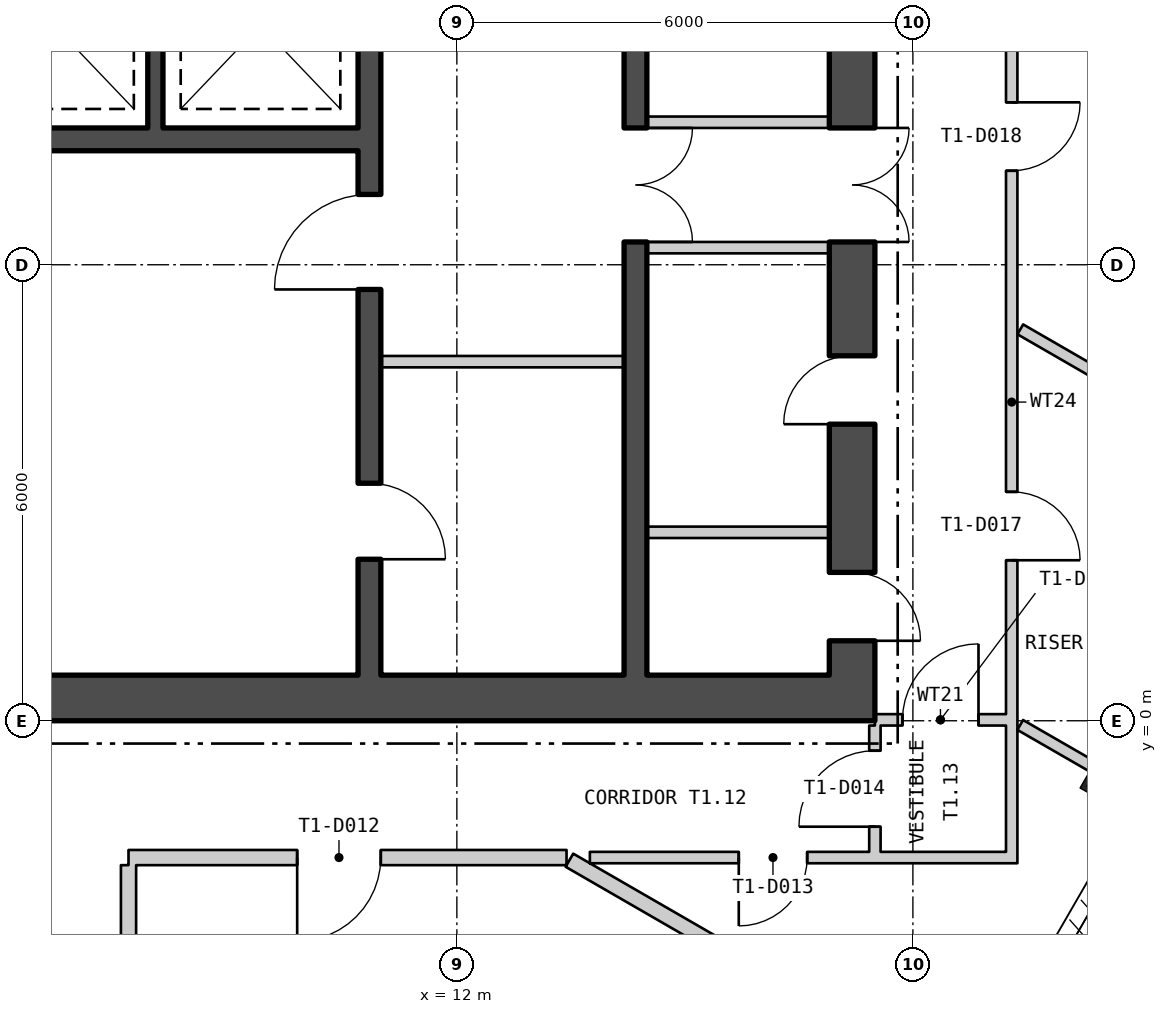
"""IFC4 building model, lengths in metres.
Left out: names, types, materials, properties, quantities, classifications, styles, units other than length and angle.
Written with IfcOpenShell. Run it as: python <this file> out.ifc"""

import sys

from ifc_helpers import new_model, si_unit, direction, frame, frame_2d, origin, origin_2d, place, context, subcontext, project, spatial, polyline, rectangle, hollow_rectangle, outline, extrude, element, fill, save


model = new_model("IFC4")
c1 = context("Model", 3, precision=1e-05, world=origin(), true_north=direction((0.0, 1.0)))
c2 = subcontext(c1, "Body", "Model", "MODEL_VIEW")
j1 = project(units=[si_unit("LENGTHUNIT", "METRE"), si_unit("PLANEANGLEUNIT", "RADIAN")], contexts=[c1])
p1 = place(None, origin())
s1 = spatial("IfcSite", under=j1, at=p1, CompositionType="ELEMENT")
p2 = place(p1, origin())
s2 = spatial("IfcBuilding", under=s1, at=p2, CompositionType="ELEMENT")
p3 = place(p2, frame((0.0, 0.0, 78.3)))
s3 = spatial("IfcBuildingStorey", under=s2, at=p3, CompositionType="ELEMENT", Elevation=78.3)
p4 = place(p3, frame((20.665, -0.778, 0.0), z_axis=(0.0, 0.0, 1.0), x_axis=(0.5, 0.866025403784, 0.0)))
e1 = element("IfcColumn", 1, at=p4, inside=s3, PredefinedType="COLUMN", context=c2, shape_type="SweptSolid", body=[
    extrude(hollow_rectangle(XDim=0.65, YDim=0.7, WallThickness=0.065, at=origin_2d()), origin(), (0.0, 0.0, 1.0), 6.0),
])
p5 = place(p3, frame((5.22, -28.679, -0.18), z_axis=(0.0, 0.0, 1.0), x_axis=(0.500000711659, 0.866024992908, 0.0)))
e2 = element("IfcWall", 2, at=p5, inside=s3, PredefinedType="SOLIDWALL", context=c2, shape_type="SweptSolid", body=[
    extrude(outline(polyline([(-0.13, -0.225), (45.87, -0.225), (45.61, 0.225), (0.13, 0.225), (-0.13, -0.225)])), origin(), (0.0, 0.0, 1.0), 6.0),
])
p6 = place(p5, frame((1.424, 0.0, 1.38)))
e3 = element("IfcOpeningElement", 3, at=p6, cuts=e2, PredefinedType="OPENING", context=c2, shape_type="SweptSolid", body=[
    extrude(rectangle(XDim=2.4, YDim=3.6, at=frame_2d((1.2, 1.8))), frame((0.0, 0.235, 0.0), z_axis=(0.0, -1.0, 0.0), x_axis=(1.0, 0.0, 0.0)), (0.0, 0.0, 1.0), 0.47),
])
p7 = place(p5, frame((5.893, 0.0, 1.38)))
e4 = element("IfcOpeningElement", 4, at=p7, cuts=e2, PredefinedType="OPENING", context=c2, shape_type="SweptSolid", body=[
    extrude(rectangle(XDim=2.4, YDim=3.6, at=frame_2d((1.2, 1.8))), frame((0.0, 0.235, 0.0), z_axis=(0.0, -1.0, 0.0), x_axis=(1.0, 0.0, 0.0)), (0.0, 0.0, 1.0), 0.47),
])
p8 = place(p5, frame((10.401, 0.0, 1.38)))
e5 = element("IfcOpeningElement", 5, at=p8, cuts=e2, PredefinedType="OPENING", context=c2, shape_type="SweptSolid", body=[
    extrude(rectangle(XDim=2.4, YDim=3.6, at=frame_2d((1.2, 1.8))), frame((0.0, 0.235, 0.0), z_axis=(0.0, -1.0, 0.0), x_axis=(1.0, 0.0, 0.0)), (0.0, 0.0, 1.0), 0.47),
])
p9 = place(p5, frame((14.909, 0.0, 1.38)))
e6 = element("IfcOpeningElement", 6, at=p9, cuts=e2, PredefinedType="OPENING", context=c2, shape_type="SweptSolid", body=[
    extrude(rectangle(XDim=2.4, YDim=3.6, at=frame_2d((1.2, 1.8))), frame((0.0, 0.235, 0.0), z_axis=(0.0, -1.0, 0.0), x_axis=(1.0, 0.0, 0.0)), (0.0, 0.0, 1.0), 0.47),
])
p10 = place(p5, frame((19.416, 0.0, 1.38)))
e7 = element("IfcOpeningElement", 7, at=p10, cuts=e2, PredefinedType="OPENING", context=c2, shape_type="SweptSolid", body=[
    extrude(rectangle(XDim=2.4, YDim=3.6, at=frame_2d((1.2, 1.8))), frame((0.0, 0.235, 0.0), z_axis=(0.0, -1.0, 0.0), x_axis=(1.0, 0.0, 0.0)), (0.0, 0.0, 1.0), 0.47),
])
p11 = place(p5, frame((23.924, 0.0, 1.38)))
e8 = element("IfcOpeningElement", 8, at=p11, cuts=e2, PredefinedType="OPENING", context=c2, shape_type="SweptSolid", body=[
    extrude(rectangle(XDim=2.4, YDim=3.6, at=frame_2d((1.2, 1.8))), frame((0.0, 0.235, 0.0), z_axis=(0.0, -1.0, 0.0), x_axis=(1.0, 0.0, 0.0)), (0.0, 0.0, 1.0), 0.47),
])
p12 = place(p5, frame((28.431, 0.0, 1.38)))
e9 = element("IfcOpeningElement", 9, at=p12, cuts=e2, PredefinedType="OPENING", context=c2, shape_type="SweptSolid", body=[
    extrude(rectangle(XDim=2.4, YDim=3.6, at=frame_2d((1.2, 1.8))), frame((0.0, 0.235, 0.0), z_axis=(0.0, -1.0, 0.0), x_axis=(1.0, 0.0, 0.0)), (0.0, 0.0, 1.0), 0.47),
])
p13 = place(p5, frame((32.939, 0.0, 1.38)))
e10 = element("IfcOpeningElement", 10, at=p13, cuts=e2, PredefinedType="OPENING", context=c2, shape_type="SweptSolid", body=[
    extrude(rectangle(XDim=2.4, YDim=3.6, at=frame_2d((1.2, 1.8))), frame((0.0, 0.235, 0.0), z_axis=(0.0, -1.0, 0.0), x_axis=(1.0, 0.0, 0.0)), (0.0, 0.0, 1.0), 0.47),
])
p14 = place(p5, frame((37.447, 0.0, 1.38)))
e11 = element("IfcOpeningElement", 11, at=p14, cuts=e2, PredefinedType="OPENING", context=c2, shape_type="SweptSolid", body=[
    extrude(rectangle(XDim=2.4, YDim=3.6, at=frame_2d((1.2, 1.8))), frame((0.0, 0.235, 0.0), z_axis=(0.0, -1.0, 0.0), x_axis=(1.0, 0.0, 0.0)), (0.0, 0.0, 1.0), 0.47),
])
p15 = place(p5, frame((41.916, 0.0, 1.38)))
e12 = element("IfcOpeningElement", 12, at=p15, cuts=e2, PredefinedType="OPENING", context=c2, shape_type="SweptSolid", body=[
    extrude(rectangle(XDim=2.4, YDim=3.6, at=frame_2d((1.2, 1.8))), frame((0.0, 0.235, 0.0), z_axis=(0.0, -1.0, 0.0), x_axis=(1.0, 0.0, 0.0)), (0.0, 0.0, 1.0), 0.47),
])
p16 = place(p3, frame((-17.5, 0.3, 0.0), z_axis=(0.0, 0.0, 1.0), x_axis=(1.0, 0.0, 0.0)))
e13 = element("IfcWall", 13, at=p16, inside=s3, PredefinedType="SHEAR", context=c2, shape_type="SweptSolid", body=[
    extrude(rectangle(XDim=35.0, YDim=0.6, at=frame_2d((17.5, 0.0))), origin(), (0.0, 0.0, 1.0), 5.8),
])
p17 = place(p16, frame((12.0, 0.0, 0.0)))
e14 = element("IfcOpeningElement", 14, at=p17, cuts=e13, PredefinedType="OPENING", context=c2, shape_type="SweptSolid", body=[
    extrude(rectangle(XDim=1.8, YDim=2.4, at=frame_2d((0.9, 1.2))), frame((0.0, 0.31, 0.0), z_axis=(0.0, -1.0, 0.0), x_axis=(1.0, 0.0, 0.0)), (0.0, 0.0, 1.0), 0.62),
])
p18 = place(p16, frame((22.0, 0.0, 0.0)))
e15 = element("IfcOpeningElement", 15, at=p18, cuts=e13, PredefinedType="OPENING", context=c2, shape_type="SweptSolid", body=[
    extrude(rectangle(XDim=1.8, YDim=2.4, at=frame_2d((0.9, 1.2))), frame((0.0, 0.31, 0.0), z_axis=(0.0, -1.0, 0.0), x_axis=(1.0, 0.0, 0.0)), (0.0, 0.0, 1.0), 0.62),
])
p19 = place(p3, frame((17.2, 0.6, 0.0), z_axis=(0.0, 0.0, 1.0), x_axis=(0.0, 1.0, 0.0)))
e16 = element("IfcWall", 16, at=p19, inside=s3, PredefinedType="SHEAR", context=c2, shape_type="SweptSolid", body=[
    extrude(rectangle(XDim=16.8, YDim=0.6, at=frame_2d((8.4, 0.0))), origin(), (0.0, 0.0, 1.0), 5.8),
])
p20 = place(p19, frame((5.7, 0.0, 0.0)))
e17 = element("IfcOpeningElement", 17, at=p20, cuts=e16, PredefinedType="OPENING", context=c2, shape_type="SweptSolid", body=[
    extrude(rectangle(XDim=1.5, YDim=2.1, at=frame_2d((0.75, 1.05))), frame((0.0, 0.31, 0.0), z_axis=(0.0, -1.0, 0.0), x_axis=(1.0, 0.0, 0.0)), (0.0, 0.0, 1.0), 0.62),
])
p21 = place(p19, frame((0.452, 0.0, 0.0)))
e18 = element("IfcOpeningElement", 18, at=p21, cuts=e16, PredefinedType="OPENING", context=c2, shape_type="SweptSolid", body=[
    extrude(rectangle(XDim=0.9, YDim=2.1, at=frame_2d((0.45, 1.05))), frame((0.0, 0.31, 0.0), z_axis=(0.0, -1.0, 0.0), x_axis=(1.0, 0.0, 0.0)), (0.0, 0.0, 1.0), 0.62),
])
p22 = place(p19, frame((3.302, 0.0, 0.0)))
e19 = element("IfcOpeningElement", 19, at=p22, cuts=e16, PredefinedType="OPENING", context=c2, shape_type="SweptSolid", body=[
    extrude(rectangle(XDim=0.9, YDim=2.1, at=frame_2d((0.45, 1.05))), frame((0.0, 0.31, 0.0), z_axis=(0.0, -1.0, 0.0), x_axis=(1.0, 0.0, 0.0)), (0.0, 0.0, 1.0), 0.62),
])
p23 = place(p19, frame((10.697, 0.0, 0.0)))
e20 = element("IfcOpeningElement", 20, at=p23, cuts=e16, PredefinedType="OPENING", context=c2, shape_type="SweptSolid", body=[
    extrude(rectangle(XDim=0.9, YDim=2.1, at=frame_2d((0.45, 1.05))), frame((0.0, 0.31, 0.0), z_axis=(0.0, -1.0, 0.0), x_axis=(1.0, 0.0, 0.0)), (0.0, 0.0, 1.0), 0.62),
])
p24 = place(p19, frame((15.4, 0.0, 0.0)))
e21 = element("IfcOpeningElement", 21, at=p24, cuts=e16, PredefinedType="OPENING", context=c2, shape_type="SweptSolid", body=[
    extrude(rectangle(XDim=1.0, YDim=2.1, at=frame_2d((0.5, 1.05))), frame((0.0, 0.31, 0.0), z_axis=(0.0, -1.0, 0.0), x_axis=(1.0, 0.0, 0.0)), (0.0, 0.0, 1.0), 0.62),
])
p25 = place(p3, frame((10.85, 0.6, 0.0), z_axis=(0.0, 0.0, 1.0), x_axis=(0.0, 1.0, 0.0)))
e22 = element("IfcWall", 22, at=p25, inside=s3, PredefinedType="SHEAR", context=c2, shape_type="SweptSolid", body=[
    extrude(rectangle(XDim=16.8, YDim=0.3, at=frame_2d((8.4, 0.0))), origin(), (0.0, 0.0, 1.0), 5.8),
])
p26 = place(p25, frame((5.075, 0.0, 0.0)))
e23 = element("IfcOpeningElement", 23, at=p26, cuts=e22, PredefinedType="OPENING", context=c2, shape_type="SweptSolid", body=[
    extrude(rectangle(XDim=1.25, YDim=2.1, at=frame_2d((0.625, 1.05))), frame((0.0, 0.16, 0.0), z_axis=(0.0, -1.0, 0.0), x_axis=(1.0, 0.0, 0.0)), (0.0, 0.0, 1.0), 0.32),
])
p27 = place(p25, frame((1.525, 0.0, 0.0)))
e24 = element("IfcOpeningElement", 24, at=p27, cuts=e22, PredefinedType="OPENING", context=c2, shape_type="SweptSolid", body=[
    extrude(rectangle(XDim=1.0, YDim=2.1, at=frame_2d((0.5, 1.05))), frame((0.0, 0.16, 0.0), z_axis=(0.0, -1.0, 0.0), x_axis=(1.0, 0.0, 0.0)), (0.0, 0.0, 1.0), 0.32),
])
p28 = place(p3, frame((14.35, 0.6, 0.0), z_axis=(0.0, 0.0, 1.0), x_axis=(0.0, 1.0, 0.0)))
e25 = element("IfcWall", 25, at=p28, inside=s3, PredefinedType="SHEAR", context=c2, shape_type="SweptSolid", body=[
    extrude(rectangle(XDim=16.8, YDim=0.3, at=frame_2d((8.4, 0.0))), origin(), (0.0, 0.0, 1.0), 5.8),
])
p29 = place(p28, frame((5.7, 0.0, 0.0)))
e26 = element("IfcOpeningElement", 26, at=p29, cuts=e25, PredefinedType="OPENING", context=c2, shape_type="SweptSolid", body=[
    extrude(rectangle(XDim=1.5, YDim=2.1, at=frame_2d((0.75, 1.05))), frame((0.0, 0.16, 0.0), z_axis=(0.0, -1.0, 0.0), x_axis=(1.0, 0.0, 0.0)), (0.0, 0.0, 1.0), 0.32),
])
p30 = place(p3, frame((2.6, 7.65, 0.0), z_axis=(0.0, 0.0, 1.0), x_axis=(1.0, 0.0, 0.0)))
e27 = element("IfcWall", 27, at=p30, inside=s3, PredefinedType="SHEAR", context=c2, shape_type="SweptSolid", body=[
    extrude(rectangle(XDim=8.1, YDim=0.3, at=frame_2d((4.05, 0.0))), origin(), (0.0, 0.0, 1.0), 5.8),
])
p31 = place(p3, frame((8.033, 7.8, 0.0), z_axis=(0.0, 0.0, 1.0), x_axis=(0.0, 1.0, 0.0)))
e28 = element("IfcWall", 28, at=p31, inside=s3, PredefinedType="SHEAR", context=c2, shape_type="SweptSolid", body=[
    extrude(rectangle(XDim=2.7, YDim=0.2, at=frame_2d((1.35, 0.0))), origin(), (0.0, 0.0, 1.0), 5.8),
])
p32 = place(p3, frame((11.0, 4.725, 0.0), z_axis=(0.0, 0.0, 1.0), x_axis=(1.0, 0.0, 0.0)))
e29 = element("IfcWall", 29, at=p32, inside=s3, PredefinedType="PARTITIONING", context=c2, shape_type="SweptSolid", body=[
    extrude(rectangle(XDim=3.2, YDim=0.15, at=frame_2d((1.6, 0.0))), origin(), (0.0, 0.0, 1.0), 5.8),
])
for number, where, z_axis, x_axis in (
    (30, (14.5, 6.225, 0.0), (0.0, 0.0, 1.0), (1.0, 0.0, 0.0)),
    (31, (14.5, 7.875, 0.0), (0.0, 0.0, 1.0), (1.0, 0.0, 0.0)),
    (32, (14.5, 2.479, 0.0), (0.0, 0.0, 1.0), (1.0, 0.0, 0.0)),
):
    element("IfcWall", number, at=place(p3, frame(where, z_axis=z_axis, x_axis=x_axis)), inside=s3, PredefinedType="PARTITIONING", context=c2, shape_type="SweptSolid", body=[
        extrude(rectangle(XDim=2.4, YDim=0.15, at=frame_2d((1.2, 0.0))), origin(), (0.0, 0.0, 1.0), 5.8),
    ])
p33 = place(p3, frame((7.68, -3.554, 0.0), z_axis=(0.0, 0.0, 1.0), x_axis=(0.0, 1.0, 0.0)))
e33 = element("IfcWall", 33, at=p33, inside=s3, PredefinedType="PARTITIONING", context=c2, shape_type="SweptSolid", body=[
    extrude(rectangle(XDim=1.654, YDim=0.2, at=frame_2d((0.827, 0.0))), origin(), (0.0, 0.0, 1.0), 5.8),
])
p34 = place(p3, frame((7.68, -1.8, 0.0), z_axis=(0.0, 0.0, 1.0), x_axis=(1.0, 0.0, 0.0)))
e34 = element("IfcWall", 34, at=p34, inside=s3, PredefinedType="PARTITIONING", context=c2, shape_type="SweptSolid", body=[
    extrude(rectangle(XDim=5.763, YDim=0.2, at=frame_2d((2.881, 0.0))), origin(), (0.0, 0.0, 1.0), 5.8),
])
p35 = place(p34, frame((2.219, 0.0, 0.0)))
e35 = element("IfcOpeningElement", 35, at=p35, cuts=e34, PredefinedType="OPENING", context=c2, shape_type="SweptSolid", body=[
    extrude(rectangle(XDim=1.1, YDim=2.1, at=frame_2d((0.55, 1.05))), frame((0.0, 0.11, 0.0), z_axis=(0.0, -1.0, 0.0), x_axis=(1.0, 0.0, 0.0)), (0.0, 0.0, 1.0), 0.22),
])
p36 = place(p3, frame((13.481, -1.835, 0.0), z_axis=(0.0, 0.0, 1.0), x_axis=(0.865956282224, -0.500119702949, 0.0)))
e36 = element("IfcWall", 36, at=p36, inside=s3, PredefinedType="PARTITIONING", context=c2, shape_type="SweptSolid", body=[
    extrude(rectangle(XDim=5.593, YDim=0.2, at=frame_2d((2.796, 0.0))), origin(), (0.0, 0.0, 1.0), 5.8),
])
p37 = place(p3, frame((13.75, -1.8, 0.0), z_axis=(0.0, 0.0, 1.0), x_axis=(1.0, 0.0, 0.0)))
e37 = element("IfcWall", 37, at=p37, inside=s3, PredefinedType="PARTITIONING", context=c2, shape_type="SweptSolid", body=[
    extrude(rectangle(XDim=5.475, YDim=0.15, at=frame_2d((2.737, 0.0))), origin(), (0.0, 0.0, 1.0), 5.8),
])
p38 = place(p37, frame((1.959, 0.0, 0.0)))
e38 = element("IfcOpeningElement", 38, at=p38, cuts=e37, PredefinedType="OPENING", context=c2, shape_type="SweptSolid", body=[
    extrude(rectangle(XDim=0.9, YDim=2.1, at=frame_2d((0.45, 1.05))), frame((0.0, 0.085, 0.0), z_axis=(0.0, -1.0, 0.0), x_axis=(1.0, 0.0, 0.0)), (0.0, 0.0, 1.0), 0.17),
])
p39 = place(p3, frame((17.5, -1.725, 0.0), z_axis=(0.0, 0.0, 1.0), x_axis=(0.0, 1.0, 0.0)))
e39 = element("IfcWall", 39, at=p39, inside=s3, PredefinedType="PARTITIONING", context=c2, shape_type="SweptSolid", body=[
    extrude(rectangle(XDim=1.662, YDim=0.15, at=frame_2d((0.831, 0.0))), origin(), (0.0, 0.0, 1.0), 5.8),
])
p40 = place(p39, frame((0.331, 0.0, 0.0)))
e40 = element("IfcOpeningElement", 40, at=p40, cuts=e39, PredefinedType="OPENING", context=c2, shape_type="SweptSolid", body=[
    extrude(rectangle(XDim=1.0, YDim=2.1, at=frame_2d((0.5, 1.05))), frame((0.0, 0.085, 0.0), z_axis=(0.0, -1.0, 0.0), x_axis=(1.0, 0.0, 0.0)), (0.0, 0.0, 1.0), 0.17),
])
p41 = place(p3, frame((17.5, 0.012, 0.0), z_axis=(0.0, 0.0, 1.0), x_axis=(1.0, 0.0, 0.0)))
e41 = element("IfcWall", 41, at=p41, inside=s3, PredefinedType="PARTITIONING", context=c2, shape_type="SweptSolid", body=[
    extrude(rectangle(XDim=1.725, YDim=0.15, at=frame_2d((0.863, 0.0))), origin(), (0.0, 0.0, 1.0), 5.2),
])
p42 = place(p41, frame((0.363, 0.0, 0.0)))
e42 = element("IfcOpeningElement", 42, at=p42, cuts=e41, PredefinedType="OPENING", context=c2, shape_type="SweptSolid", body=[
    extrude(rectangle(XDim=1.0, YDim=2.1, at=frame_2d((0.5, 1.05))), frame((0.0, 0.085, 0.0), z_axis=(0.0, -1.0, 0.0), x_axis=(1.0, 0.0, 0.0)), (0.0, 0.0, 1.0), 0.17),
])
p43 = place(p3, frame((19.214, 10.469, 0.0), z_axis=(0.0, 0.0, 1.0), x_axis=(0.866102085121, -0.499867160503, 0.0)))
e43 = element("IfcWall", 43, at=p43, inside=s3, PredefinedType="PARTITIONING", context=c2, shape_type="SweptSolid", body=[
    extrude(rectangle(XDim=6.78, YDim=0.2, at=frame_2d((3.39, 0.0))), origin(), (0.0, 0.0, 1.0), 5.8),
])
p44 = place(p3, frame((19.3, -1.875, 0.0), z_axis=(0.0, 0.0, 1.0), x_axis=(0.0, 1.0, 0.0)))
e44 = element("IfcWall", 44, at=p44, inside=s3, PredefinedType="PARTITIONING", context=c2, shape_type="SweptSolid", body=[
    extrude(rectangle(XDim=12.136, YDim=0.15, at=frame_2d((6.068, 0.0))), origin(), (0.0, 0.0, 1.0), 5.8),
])
p45 = place(p44, frame((3.987, 0.0, 0.0)))
e45 = element("IfcOpeningElement", 45, at=p45, cuts=e44, PredefinedType="OPENING", context=c2, shape_type="SweptSolid", body=[
    extrude(rectangle(XDim=0.9, YDim=2.1, at=frame_2d((0.45, 1.05))), frame((0.0, 0.085, 0.0), z_axis=(0.0, -1.0, 0.0), x_axis=(1.0, 0.0, 0.0)), (0.0, 0.0, 1.0), 0.17),
])
p46 = place(p44, frame((9.112, 0.0, 0.0)))
e46 = element("IfcOpeningElement", 46, at=p46, cuts=e44, PredefinedType="OPENING", context=c2, shape_type="SweptSolid", body=[
    extrude(rectangle(XDim=0.9, YDim=2.1, at=frame_2d((0.45, 1.05))), frame((0.0, 0.085, 0.0), z_axis=(0.0, -1.0, 0.0), x_axis=(1.0, 0.0, 0.0)), (0.0, 0.0, 1.0), 0.17),
])
p47 = place(p3, frame((19.412, -0.055, 0.0), z_axis=(0.0, 0.0, 1.0), x_axis=(0.866408170701, -0.499336441433, 0.0)))
e47 = element("IfcWall", 47, at=p47, inside=s3, PredefinedType="PARTITIONING", context=c2, shape_type="SweptSolid", body=[
    extrude(rectangle(XDim=1.346, YDim=0.15, at=frame_2d((0.673, 0.0))), origin(), (0.0, 0.0, 1.0), 5.8),
])
p48 = place(p3, frame((19.413, 5.15, 0.0), z_axis=(0.0, 0.0, 1.0), x_axis=(0.866021079084, -0.500007490527, 0.0)))
e48 = element("IfcWall", 48, at=p48, inside=s3, PredefinedType="PARTITIONING", context=c2, shape_type="SweptSolid", body=[
    extrude(rectangle(XDim=3.948, YDim=0.15, at=frame_2d((1.974, 0.0))), origin(), (0.0, 0.0, 1.0), 5.8),
])
p49 = place(p26, origin())
e49 = element("IfcDoor", 49, at=p49, inside=s3, OperationType="SINGLE_SWING_RIGHT", PredefinedType="DOOR", context=c2, shape_type="SweptSolid", body=[
    extrude(rectangle(XDim=1.25, YDim=2.1, at=frame_2d((0.625, 1.05))), frame((0.0, 0.025, 0.0), z_axis=(0.0, -1.0, 0.0), x_axis=(1.0, 0.0, 0.0)), (0.0, 0.0, 1.0), 0.05),
])
fill(e23, e49)
p50 = place(p27, origin())
e50 = element("IfcDoor", 50, at=p50, inside=s3, OperationType="SINGLE_SWING_LEFT", PredefinedType="DOOR", context=c2, shape_type="SweptSolid", body=[
    extrude(rectangle(XDim=1.0, YDim=2.1, at=frame_2d((0.5, 1.05))), frame((0.0, 0.025, 0.0), z_axis=(0.0, -1.0, 0.0), x_axis=(1.0, 0.0, 0.0)), (0.0, 0.0, 1.0), 0.05),
])
fill(e24, e50)
p51 = place(p29, origin())
e51 = element("IfcDoor", 51, at=p51, inside=s3, OperationType="DOUBLE_DOOR_SINGLE_SWING", PredefinedType="DOOR", context=c2, shape_type="SweptSolid", body=[
    extrude(rectangle(XDim=1.5, YDim=2.1, at=frame_2d((0.75, 1.05))), frame((0.0, 0.025, 0.0), z_axis=(0.0, -1.0, 0.0), x_axis=(1.0, 0.0, 0.0)), (0.0, 0.0, 1.0), 0.05),
])
fill(e26, e51)
p52 = place(p20, origin())
e52 = element("IfcDoor", 52, at=p52, inside=s3, OperationType="DOUBLE_DOOR_SINGLE_SWING", PredefinedType="DOOR", context=c2, shape_type="SweptSolid", body=[
    extrude(rectangle(XDim=1.5, YDim=2.1, at=frame_2d((0.75, 1.05))), frame((0.0, 0.025, 0.0), z_axis=(0.0, -1.0, 0.0), x_axis=(1.0, 0.0, 0.0)), (0.0, 0.0, 1.0), 0.05),
])
fill(e17, e52)
p53 = place(p21, origin())
e53 = element("IfcDoor", 53, at=p53, inside=s3, OperationType="SINGLE_SWING_LEFT", PredefinedType="DOOR", context=c2, shape_type="SweptSolid", body=[
    extrude(rectangle(XDim=0.9, YDim=2.1, at=frame_2d((0.45, 1.05))), frame((0.0, 0.025, 0.0), z_axis=(0.0, -1.0, 0.0), x_axis=(1.0, 0.0, 0.0)), (0.0, 0.0, 1.0), 0.05),
])
fill(e18, e53)
p54 = place(p22, origin())
e54 = element("IfcDoor", 54, at=p54, inside=s3, OperationType="SINGLE_SWING_RIGHT", PredefinedType="DOOR", context=c2, shape_type="SweptSolid", body=[
    extrude(rectangle(XDim=0.9, YDim=2.1, at=frame_2d((0.45, 1.05))), frame((0.0, 0.025, 0.0), z_axis=(0.0, -1.0, 0.0), x_axis=(1.0, 0.0, 0.0)), (0.0, 0.0, 1.0), 0.05),
])
fill(e19, e54)
p55 = place(p35, origin())
e55 = element("IfcDoor", 55, at=p55, inside=s3, OperationType="SINGLE_SWING_LEFT", PredefinedType="DOOR", context=c2, shape_type="SweptSolid", body=[
    extrude(rectangle(XDim=1.1, YDim=2.1, at=frame_2d((0.55, 1.05))), frame((0.0, 0.025, 0.0), z_axis=(0.0, -1.0, 0.0), x_axis=(1.0, 0.0, 0.0)), (0.0, 0.0, 1.0), 0.05),
])
fill(e35, e55)
p56 = place(p38, origin())
e56 = element("IfcDoor", 56, at=p56, inside=s3, OperationType="SINGLE_SWING_LEFT", PredefinedType="DOOR", context=c2, shape_type="SweptSolid", body=[
    extrude(rectangle(XDim=0.9, YDim=2.1, at=frame_2d((0.45, 1.05))), frame((0.0, 0.025, 0.0), z_axis=(0.0, -1.0, 0.0), x_axis=(1.0, 0.0, 0.0)), (0.0, 0.0, 1.0), 0.05),
])
fill(e38, e56)
p57 = place(p40, origin())
e57 = element("IfcDoor", 57, at=p57, inside=s3, OperationType="SINGLE_SWING_RIGHT", PredefinedType="DOOR", context=c2, shape_type="SweptSolid", body=[
    extrude(rectangle(XDim=1.0, YDim=2.1, at=frame_2d((0.5, 1.05))), frame((0.0, 0.025, 0.0), z_axis=(0.0, -1.0, 0.0), x_axis=(1.0, 0.0, 0.0)), (0.0, 0.0, 1.0), 0.05),
])
fill(e40, e57)
p58 = place(p42, origin())
e58 = element("IfcDoor", 58, at=p58, inside=s3, OperationType="SINGLE_SWING_LEFT", PredefinedType="DOOR", context=c2, shape_type="SweptSolid", body=[
    extrude(rectangle(XDim=1.0, YDim=2.1, at=frame_2d((0.5, 1.05))), frame((0.0, 0.025, 0.0), z_axis=(0.0, -1.0, 0.0), x_axis=(1.0, 0.0, 0.0)), (0.0, 0.0, 1.0), 0.05),
])
fill(e42, e58)
p59 = place(p45, origin())
e59 = element("IfcDoor", 59, at=p59, inside=s3, OperationType="SINGLE_SWING_LEFT", PredefinedType="DOOR", context=c2, shape_type="SweptSolid", body=[
    extrude(rectangle(XDim=0.9, YDim=2.1, at=frame_2d((0.45, 1.05))), frame((0.0, 0.025, 0.0), z_axis=(0.0, -1.0, 0.0), x_axis=(1.0, 0.0, 0.0)), (0.0, 0.0, 1.0), 0.05),
])
fill(e45, e59)
p60 = place(p46, origin())
e60 = element("IfcDoor", 60, at=p60, inside=s3, OperationType="SINGLE_SWING_RIGHT", PredefinedType="DOOR", context=c2, shape_type="SweptSolid", body=[
    extrude(rectangle(XDim=0.9, YDim=2.1, at=frame_2d((0.45, 1.05))), frame((0.0, 0.025, 0.0), z_axis=(0.0, -1.0, 0.0), x_axis=(1.0, 0.0, 0.0)), (0.0, 0.0, 1.0), 0.05),
])
fill(e46, e60)
save(model, sys.argv[1])
